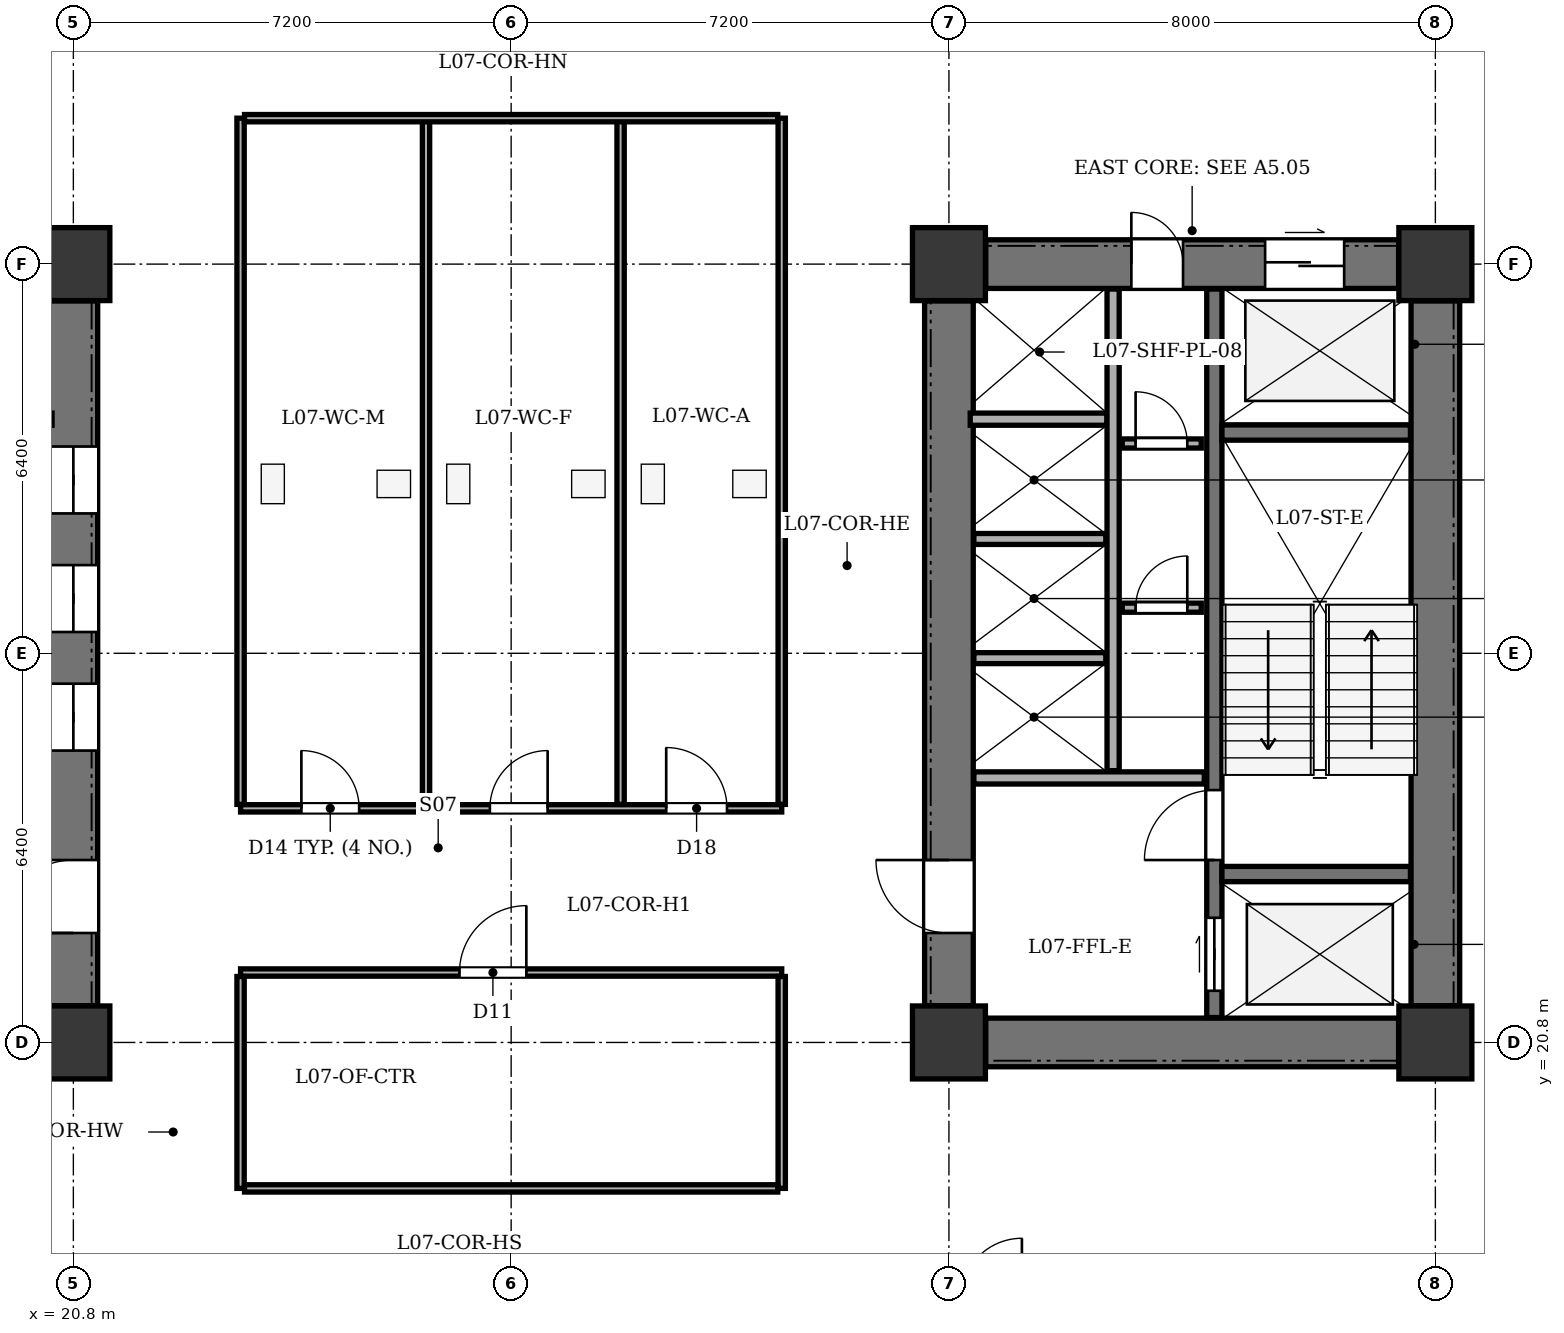
"""IFC4 building model, lengths in metres.
Left out: names, types, materials, properties, quantities, classifications, styles, units other than length and angle.
Written with IfcOpenShell. Run it as: python <this file> out.ifc"""

import sys

from ifc_helpers import new_model, si_unit, direction, frame, frame_2d, origin, origin_2d, place, context, subcontext, project, spatial, rectangle, extrude, element, fill, save


model = new_model("IFC4")
c1 = context("Model", 3, precision=1e-05, world=origin(), true_north=direction((0.0, 1.0)))
c2 = subcontext(c1, "Body", "Model", "MODEL_VIEW")
j1 = project(units=[si_unit("LENGTHUNIT", "METRE"), si_unit("PLANEANGLEUNIT", "RADIAN")], contexts=[c1])
p1 = place(None, origin())
s1 = spatial("IfcSite", under=j1, at=p1, CompositionType="ELEMENT")
p2 = place(p1, origin())
s2 = spatial("IfcBuilding", under=s1, at=p2, CompositionType="ELEMENT")
p3 = place(p2, frame((0.0, 0.0, 32.1)))
s3 = spatial("IfcBuildingStorey", under=s2, at=p3, CompositionType="ELEMENT", Elevation=32.1)
for number, where, z_axis, x_axis in (
    (1, (20.8, 20.8, 0.0), (0.0, 0.0, 1.0), (1.0, 0.0, 0.0)),
    (2, (20.8, 33.6, 0.0), (0.0, 0.0, 1.0), (1.0, 0.0, 0.0)),
    (3, (35.2, 20.8, 0.0), (0.0, 0.0, 1.0), (1.0, 0.0, 0.0)),
    (4, (43.2, 20.8, 0.0), (0.0, 0.0, 1.0), (1.0, 0.0, 0.0)),
    (5, (35.2, 33.6, 0.0), (0.0, 0.0, 1.0), (1.0, 0.0, 0.0)),
    (6, (43.2, 33.6, 0.0), (0.0, 0.0, 1.0), (1.0, 0.0, 0.0)),
):
    element("IfcColumn", number, at=place(p3, frame(where, z_axis=z_axis, x_axis=x_axis)), inside=s3, PredefinedType="COLUMN", context=c2, shape_type="SweptSolid", body=[
        extrude(rectangle(XDim=1.2, YDim=1.2, at=origin_2d()), origin(), (0.0, 0.0, 1.0), 3.9),
    ])
p4 = place(p3, frame((20.8, 21.405, 0.0), z_axis=(0.0, 0.0, 1.0), x_axis=(0.0, 1.0, 0.0)))
e7 = element("IfcWall", 7, at=p4, inside=s3, PredefinedType="SHEAR", context=c2, shape_type="SweptSolid", body=[
    extrude(rectangle(XDim=11.59, YDim=0.8, at=frame_2d((5.795, 0.0))), origin(), (0.0, 0.0, 1.0), 3.6),
])
p5 = place(p4, frame((1.195, 0.0, 0.0)))
e8 = element("IfcOpeningElement", 8, at=p5, cuts=e7, PredefinedType="OPENING", context=c2, shape_type="SweptSolid", body=[
    extrude(rectangle(XDim=1.2, YDim=2.15, at=frame_2d((0.6, 1.075))), frame((0.0, 0.41, 0.0), z_axis=(0.0, -1.0, 0.0), x_axis=(1.0, 0.0, 0.0)), (0.0, 0.0, 1.0), 0.82),
])
p6 = place(p4, frame((4.195, 0.0, 0.0)))
e9 = element("IfcOpeningElement", 9, at=p6, cuts=e7, PredefinedType="OPENING", context=c2, shape_type="SweptSolid", body=[
    extrude(rectangle(XDim=1.1, YDim=2.1, at=frame_2d((0.55, 1.05))), frame((0.0, 0.41, 0.0), z_axis=(0.0, -1.0, 0.0), x_axis=(1.0, 0.0, 0.0)), (0.0, 0.0, 1.0), 0.82),
])
p7 = place(p4, frame((6.145, 0.0, 0.0)))
e10 = element("IfcOpeningElement", 10, at=p7, cuts=e7, PredefinedType="OPENING", context=c2, shape_type="SweptSolid", body=[
    extrude(rectangle(XDim=1.1, YDim=2.1, at=frame_2d((0.55, 1.05))), frame((0.0, 0.41, 0.0), z_axis=(0.0, -1.0, 0.0), x_axis=(1.0, 0.0, 0.0)), (0.0, 0.0, 1.0), 0.82),
])
p8 = place(p4, frame((8.095, 0.0, 0.0)))
e11 = element("IfcOpeningElement", 11, at=p8, cuts=e7, PredefinedType="OPENING", context=c2, shape_type="SweptSolid", body=[
    extrude(rectangle(XDim=1.1, YDim=2.1, at=frame_2d((0.55, 1.05))), frame((0.0, 0.41, 0.0), z_axis=(0.0, -1.0, 0.0), x_axis=(1.0, 0.0, 0.0)), (0.0, 0.0, 1.0), 0.82),
])
p9 = place(p3, frame((43.2, 21.405, 0.0), z_axis=(0.0, 0.0, 1.0), x_axis=(0.0, 1.0, 0.0)))
e12 = element("IfcWall", 12, at=p9, inside=s3, PredefinedType="SHEAR", context=c2, shape_type="SweptSolid", body=[
    extrude(rectangle(XDim=11.59, YDim=0.8, at=frame_2d((5.795, 0.0))), origin(), (0.0, 0.0, 1.0), 3.6),
])
p10 = place(p3, frame((35.805, 20.8, 0.0), z_axis=(0.0, 0.0, 1.0), x_axis=(1.0, 0.0, 0.0)))
e13 = element("IfcWall", 13, at=p10, inside=s3, PredefinedType="SHEAR", context=c2, shape_type="SweptSolid", body=[
    extrude(rectangle(XDim=6.79, YDim=0.8, at=frame_2d((3.395, 0.0))), origin(), (0.0, 0.0, 1.0), 3.6),
])
p11 = place(p3, frame((35.805, 33.6, 0.0), z_axis=(0.0, 0.0, 1.0), x_axis=(1.0, 0.0, 0.0)))
e14 = element("IfcWall", 14, at=p11, inside=s3, PredefinedType="SHEAR", context=c2, shape_type="SweptSolid", body=[
    extrude(rectangle(XDim=6.79, YDim=0.8, at=frame_2d((3.395, 0.0))), origin(), (0.0, 0.0, 1.0), 3.6),
])
p12 = place(p11, frame((4.595, 0.0, 0.0)))
e15 = element("IfcOpeningElement", 15, at=p12, cuts=e14, PredefinedType="OPENING", context=c2, shape_type="SweptSolid", body=[
    extrude(rectangle(XDim=1.3, YDim=2.15, at=frame_2d((0.65, 1.075))), frame((0.0, 0.41, 0.0), z_axis=(0.0, -1.0, 0.0), x_axis=(1.0, 0.0, 0.0)), (0.0, 0.0, 1.0), 0.82),
])
p13 = place(p11, frame((2.395, 0.0, 0.0)))
e16 = element("IfcOpeningElement", 16, at=p13, cuts=e14, PredefinedType="OPENING", context=c2, shape_type="SweptSolid", body=[
    extrude(rectangle(XDim=0.85, YDim=2.02, at=frame_2d((0.425, 1.01))), frame((0.0, 0.41, 0.0), z_axis=(0.0, -1.0, 0.0), x_axis=(1.0, 0.0, 0.0)), (0.0, 0.0, 1.0), 0.82),
])
p14 = place(p3, frame((35.2, 21.405, 0.0), z_axis=(0.0, 0.0, 1.0), x_axis=(0.0, 1.0, 0.0)))
e17 = element("IfcWall", 17, at=p14, inside=s3, PredefinedType="SHEAR", context=c2, shape_type="SweptSolid", body=[
    extrude(rectangle(XDim=11.59, YDim=0.8, at=frame_2d((5.795, 0.0))), origin(), (0.0, 0.0, 1.0), 3.6),
])
p15 = place(p14, frame((1.195, 0.0, 0.0)))
e18 = element("IfcOpeningElement", 18, at=p15, cuts=e17, PredefinedType="OPENING", context=c2, shape_type="SweptSolid", body=[
    extrude(rectangle(XDim=1.2, YDim=2.15, at=frame_2d((0.6, 1.075))), frame((0.0, 0.41, 0.0), z_axis=(0.0, -1.0, 0.0), x_axis=(1.0, 0.0, 0.0)), (0.0, 0.0, 1.0), 0.82),
])
p16 = place(p3, frame((39.565, 21.21, 0.0), z_axis=(0.0, 0.0, 1.0), x_axis=(0.0, 1.0, 0.0)))
e19 = element("IfcWall", 19, at=p16, inside=s3, PredefinedType="SHEAR", context=c2, shape_type="SweptSolid", body=[
    extrude(rectangle(XDim=11.98, YDim=0.25, at=frame_2d((5.99, 0.0))), origin(), (0.0, 0.0, 1.0), 3.6),
])
p17 = place(p16, frame((0.44, 0.0, 0.0)))
e20 = element("IfcOpeningElement", 20, at=p17, cuts=e19, PredefinedType="OPENING", context=c2, shape_type="SweptSolid", body=[
    extrude(rectangle(XDim=1.2, YDim=2.15, at=frame_2d((0.6, 1.075))), frame((0.0, 0.135, 0.0), z_axis=(0.0, -1.0, 0.0), x_axis=(1.0, 0.0, 0.0)), (0.0, 0.0, 1.0), 0.27),
])
p18 = place(p16, frame((2.59, 0.0, 0.0)))
e21 = element("IfcOpeningElement", 21, at=p18, cuts=e19, PredefinedType="OPENING", context=c2, shape_type="SweptSolid", body=[
    extrude(rectangle(XDim=1.15, YDim=2.15, at=frame_2d((0.575, 1.075))), frame((0.0, 0.135, 0.0), z_axis=(0.0, -1.0, 0.0), x_axis=(1.0, 0.0, 0.0)), (0.0, 0.0, 1.0), 0.27),
])
for number, where, z_axis, x_axis in (
    (22, (39.69, 23.57, 0.0), (0.0, 0.0, 1.0), (1.0, 0.0, 0.0)),
    (23, (39.69, 30.83, 0.0), (0.0, 0.0, 1.0), (1.0, 0.0, 0.0)),
):
    element("IfcWall", number, at=place(p3, frame(where, z_axis=z_axis, x_axis=x_axis)), inside=s3, PredefinedType="SHEAR", context=c2, shape_type="SweptSolid", body=[
        extrude(rectangle(XDim=3.1, YDim=0.25, at=frame_2d((1.55, 0.0))), origin(), (0.0, 0.0, 1.0), 3.6),
    ])
p19 = place(p3, frame((35.61, 25.15, 0.0), z_axis=(0.0, 0.0, 1.0), x_axis=(1.0, 0.0, 0.0)))
e24 = element("IfcWall", 24, at=p19, inside=s3, PredefinedType="SOLIDWALL", context=c2, shape_type="SweptSolid", body=[
    extrude(rectangle(XDim=3.79, YDim=0.2, at=frame_2d((1.895, 0.0))), origin(), (0.0, 0.0, 1.0), 3.6),
])
p20 = place(p3, frame((35.55, 31.05, 0.0), z_axis=(0.0, 0.0, 1.0), x_axis=(1.0, 0.0, 0.0)))
e25 = element("IfcWall", 25, at=p20, inside=s3, PredefinedType="SOLIDWALL", context=c2, shape_type="SweptSolid", body=[
    extrude(rectangle(XDim=2.25, YDim=0.2, at=frame_2d((1.125, 0.0))), origin(), (0.0, 0.0, 1.0), 3.6),
])
p21 = place(p3, frame((37.9, 25.27, 0.0), z_axis=(0.0, 0.0, 1.0), x_axis=(0.0, 1.0, 0.0)))
e26 = element("IfcWall", 26, at=p21, inside=s3, PredefinedType="SOLIDWALL", context=c2, shape_type="SweptSolid", body=[
    extrude(rectangle(XDim=7.92, YDim=0.2, at=frame_2d((3.96, 0.0))), origin(), (0.0, 0.0, 1.0), 3.6),
])
for number, where, z_axis, x_axis in (
    (27, (35.61, 27.12, 0.0), (0.0, 0.0, 1.0), (1.0, 0.0, 0.0)),
    (28, (35.61, 29.08, 0.0), (0.0, 0.0, 1.0), (1.0, 0.0, 0.0)),
):
    element("IfcWall", number, at=place(p3, frame(where, z_axis=z_axis, x_axis=x_axis)), inside=s3, PredefinedType="PARTITIONING", context=c2, shape_type="SweptSolid", body=[
        extrude(rectangle(XDim=2.17, YDim=0.18, at=frame_2d((1.085, 0.0))), origin(), (0.0, 0.0, 1.0), 3.6),
    ])
p22 = place(p3, frame((38.05, 27.95, 0.0), z_axis=(0.0, 0.0, 1.0), x_axis=(1.0, 0.0, 0.0)))
e29 = element("IfcWall", 29, at=p22, inside=s3, PredefinedType="PARTITIONING", context=c2, shape_type="SweptSolid", body=[
    extrude(rectangle(XDim=1.3, YDim=0.15, at=frame_2d((0.65, 0.0))), origin(), (0.0, 0.0, 1.0), 3.6),
])
p23 = place(p22, frame((0.22, 0.0, 0.0)))
e30 = element("IfcOpeningElement", 30, at=p23, cuts=e29, PredefinedType="OPENING", context=c2, shape_type="SweptSolid", body=[
    extrude(rectangle(XDim=0.85, YDim=2.02, at=frame_2d((0.425, 1.01))), frame((0.0, 0.085, 0.0), z_axis=(0.0, -1.0, 0.0), x_axis=(1.0, 0.0, 0.0)), (0.0, 0.0, 1.0), 0.17),
])
p24 = place(p3, frame((38.05, 30.65, 0.0), z_axis=(0.0, 0.0, 1.0), x_axis=(1.0, 0.0, 0.0)))
e31 = element("IfcWall", 31, at=p24, inside=s3, PredefinedType="PARTITIONING", context=c2, shape_type="SweptSolid", body=[
    extrude(rectangle(XDim=1.3, YDim=0.15, at=frame_2d((0.65, 0.0))), origin(), (0.0, 0.0, 1.0), 3.6),
])
p25 = place(p24, frame((0.22, 0.0, 0.0)))
e32 = element("IfcOpeningElement", 32, at=p25, cuts=e31, PredefinedType="OPENING", context=c2, shape_type="SweptSolid", body=[
    extrude(rectangle(XDim=0.85, YDim=2.02, at=frame_2d((0.425, 1.01))), frame((0.0, 0.085, 0.0), z_axis=(0.0, -1.0, 0.0), x_axis=(1.0, 0.0, 0.0)), (0.0, 0.0, 1.0), 0.17),
])
p26 = place(p3, frame((23.55, 24.65, 0.0), z_axis=(0.0, 0.0, 1.0), x_axis=(1.0, 0.0, 0.0)))
e33 = element("IfcWall", 33, at=p26, inside=s3, PredefinedType="PARTITIONING", context=c2, shape_type="SweptSolid", body=[
    extrude(rectangle(XDim=8.9, YDim=0.12, at=frame_2d((4.45, 0.0))), origin(), (0.0, 0.0, 1.0), 3.135),
])
p27 = place(p26, frame((1.0, 0.0, 0.0)))
e34 = element("IfcOpeningElement", 34, at=p27, cuts=e33, PredefinedType="OPENING", context=c2, shape_type="SweptSolid", body=[
    extrude(rectangle(XDim=0.95, YDim=2.1, at=frame_2d((0.475, 1.05))), frame((0.0, 0.07, 0.0), z_axis=(0.0, -1.0, 0.0), x_axis=(1.0, 0.0, 0.0)), (0.0, 0.0, 1.0), 0.14),
])
p28 = place(p26, frame((4.1, 0.0, 0.0)))
e35 = element("IfcOpeningElement", 35, at=p28, cuts=e33, PredefinedType="OPENING", context=c2, shape_type="SweptSolid", body=[
    extrude(rectangle(XDim=0.95, YDim=2.1, at=frame_2d((0.475, 1.05))), frame((0.0, 0.07, 0.0), z_axis=(0.0, -1.0, 0.0), x_axis=(1.0, 0.0, 0.0)), (0.0, 0.0, 1.0), 0.14),
])
p29 = place(p26, frame((7.0, 0.0, 0.0)))
e36 = element("IfcOpeningElement", 36, at=p29, cuts=e33, PredefinedType="OPENING", context=c2, shape_type="SweptSolid", body=[
    extrude(rectangle(XDim=1.0, YDim=2.1, at=frame_2d((0.5, 1.05))), frame((0.0, 0.07, 0.0), z_axis=(0.0, -1.0, 0.0), x_axis=(1.0, 0.0, 0.0)), (0.0, 0.0, 1.0), 0.14),
])
for number, where, z_axis, x_axis in (
    (37, (23.55, 24.715, 0.0), (0.0, 0.0, 1.0), (0.0, 1.0, 0.0)),
    (38, (32.45, 24.715, 0.0), (0.0, 0.0, 1.0), (0.0, 1.0, 0.0)),
    (39, (26.6, 24.715, 0.0), (0.0, 0.0, 1.0), (0.0, 1.0, 0.0)),
):
    element("IfcWall", number, at=place(p3, frame(where, z_axis=z_axis, x_axis=x_axis)), inside=s3, PredefinedType="PARTITIONING", context=c2, shape_type="SweptSolid", body=[
        extrude(rectangle(XDim=11.285, YDim=0.12, at=frame_2d((5.643, 0.0))), origin(), (0.0, 0.0, 1.0), 3.6),
    ])
p30 = place(p3, frame((29.8, 24.715, 0.0), z_axis=(0.0, 0.0, 1.0), x_axis=(0.0, 1.0, 0.0)))
e40 = element("IfcWall", 40, at=p30, inside=s3, PredefinedType="PARTITIONING", context=c2, shape_type="SweptSolid", body=[
    extrude(rectangle(XDim=11.285, YDim=0.12, at=frame_2d((5.643, 0.0))), origin(), (0.0, 0.0, 1.0), 3.135),
])
p31 = place(p3, frame((23.615, 36.0, 0.0), z_axis=(0.0, 0.0, 1.0), x_axis=(1.0, 0.0, 0.0)))
e41 = element("IfcWall", 41, at=p31, inside=s3, PredefinedType="PARTITIONING", context=c2, shape_type="SweptSolid", body=[
    extrude(rectangle(XDim=8.77, YDim=0.12, at=frame_2d((4.385, 0.0))), origin(), (0.0, 0.0, 1.0), 3.6),
])
p32 = place(p3, frame((23.55, 21.95, 0.0), z_axis=(0.0, 0.0, 1.0), x_axis=(1.0, 0.0, 0.0)))
e42 = element("IfcWall", 42, at=p32, inside=s3, PredefinedType="PARTITIONING", context=c2, shape_type="SweptSolid", body=[
    extrude(rectangle(XDim=8.9, YDim=0.12, at=frame_2d((4.45, 0.0))), origin(), (0.0, 0.0, 1.0), 3.135),
])
p33 = place(p32, frame((3.6, 0.0, 0.0)))
e43 = element("IfcOpeningElement", 43, at=p33, cuts=e42, PredefinedType="OPENING", context=c2, shape_type="SweptSolid", body=[
    extrude(rectangle(XDim=1.1, YDim=2.15, at=frame_2d((0.55, 1.075))), frame((0.0, 0.07, 0.0), z_axis=(0.0, -1.0, 0.0), x_axis=(1.0, 0.0, 0.0)), (0.0, 0.0, 1.0), 0.14),
])
for number, where, z_axis, x_axis in (
    (44, (23.55, 18.4, 0.0), (0.0, 0.0, 1.0), (0.0, 1.0, 0.0)),
    (45, (32.45, 18.4, 0.0), (0.0, 0.0, 1.0), (0.0, 1.0, 0.0)),
):
    element("IfcWall", number, at=place(p3, frame(where, z_axis=z_axis, x_axis=x_axis)), inside=s3, PredefinedType="PARTITIONING", context=c2, shape_type="SweptSolid", body=[
        extrude(rectangle(XDim=3.485, YDim=0.12, at=frame_2d((1.743, 0.0))), origin(), (0.0, 0.0, 1.0), 3.6),
    ])
p34 = place(p3, frame((23.615, 18.4, 0.0), z_axis=(0.0, 0.0, 1.0), x_axis=(1.0, 0.0, 0.0)))
e46 = element("IfcWall", 46, at=p34, inside=s3, PredefinedType="PARTITIONING", context=c2, shape_type="SweptSolid", body=[
    extrude(rectangle(XDim=8.77, YDim=0.12, at=frame_2d((4.385, 0.0))), origin(), (0.0, 0.0, 1.0), 3.6),
])
p35 = place(p5, origin())
e47 = element("IfcDoor", 47, at=p35, inside=s3, OperationType="SINGLE_SWING_LEFT", PredefinedType="DOOR", context=c2, shape_type="SweptSolid", body=[
    extrude(rectangle(XDim=1.2, YDim=2.15, at=frame_2d((0.6, 1.075))), frame((0.0, 0.025, 0.0), z_axis=(0.0, -1.0, 0.0), x_axis=(1.0, 0.0, 0.0)), (0.0, 0.0, 1.0), 0.05),
])
fill(e8, e47)
p36 = place(p6, origin())
e48 = element("IfcDoor", 48, at=p36, inside=s3, OperationType="DOUBLE_DOOR_SLIDING", PredefinedType="DOOR", context=c2, shape_type="SweptSolid", body=[
    extrude(rectangle(XDim=1.1, YDim=2.1, at=frame_2d((0.55, 1.05))), frame((0.0, 0.025, 0.0), z_axis=(0.0, -1.0, 0.0), x_axis=(1.0, 0.0, 0.0)), (0.0, 0.0, 1.0), 0.05),
])
fill(e9, e48)
p37 = place(p7, origin())
e49 = element("IfcDoor", 49, at=p37, inside=s3, OperationType="DOUBLE_DOOR_SLIDING", PredefinedType="DOOR", context=c2, shape_type="SweptSolid", body=[
    extrude(rectangle(XDim=1.1, YDim=2.1, at=frame_2d((0.55, 1.05))), frame((0.0, 0.025, 0.0), z_axis=(0.0, -1.0, 0.0), x_axis=(1.0, 0.0, 0.0)), (0.0, 0.0, 1.0), 0.05),
])
fill(e10, e49)
p38 = place(p8, origin())
e50 = element("IfcDoor", 50, at=p38, inside=s3, OperationType="DOUBLE_DOOR_SLIDING", PredefinedType="DOOR", context=c2, shape_type="SweptSolid", body=[
    extrude(rectangle(XDim=1.1, YDim=2.1, at=frame_2d((0.55, 1.05))), frame((0.0, 0.025, 0.0), z_axis=(0.0, -1.0, 0.0), x_axis=(1.0, 0.0, 0.0)), (0.0, 0.0, 1.0), 0.05),
])
fill(e11, e50)
p39 = place(p12, origin())
e51 = element("IfcDoor", 51, at=p39, inside=s3, OperationType="DOUBLE_DOOR_SLIDING", PredefinedType="DOOR", context=c2, shape_type="SweptSolid", body=[
    extrude(rectangle(XDim=1.3, YDim=2.15, at=frame_2d((0.65, 1.075))), frame((0.0, 0.025, 0.0), z_axis=(0.0, -1.0, 0.0), x_axis=(1.0, 0.0, 0.0)), (0.0, 0.0, 1.0), 0.05),
])
fill(e15, e51)
p40 = place(p13, origin())
e52 = element("IfcDoor", 52, at=p40, inside=s3, OperationType="SINGLE_SWING_LEFT", PredefinedType="DOOR", context=c2, shape_type="SweptSolid", body=[
    extrude(rectangle(XDim=0.85, YDim=2.02, at=frame_2d((0.425, 1.01))), frame((0.0, 0.025, 0.0), z_axis=(0.0, -1.0, 0.0), x_axis=(1.0, 0.0, 0.0)), (0.0, 0.0, 1.0), 0.05),
])
fill(e16, e52)
p41 = place(p15, origin())
e53 = element("IfcDoor", 53, at=p41, inside=s3, OperationType="SINGLE_SWING_RIGHT", PredefinedType="DOOR", context=c2, shape_type="SweptSolid", body=[
    extrude(rectangle(XDim=1.2, YDim=2.15, at=frame_2d((0.6, 1.075))), frame((0.0, 0.025, 0.0), z_axis=(0.0, -1.0, 0.0), x_axis=(1.0, 0.0, 0.0)), (0.0, 0.0, 1.0), 0.05),
])
fill(e18, e53)
p42 = place(p17, origin())
e54 = element("IfcDoor", 54, at=p42, inside=s3, OperationType="DOUBLE_DOOR_SLIDING", PredefinedType="DOOR", context=c2, shape_type="SweptSolid", body=[
    extrude(rectangle(XDim=1.2, YDim=2.15, at=frame_2d((0.6, 1.075))), frame((0.0, 0.025, 0.0), z_axis=(0.0, -1.0, 0.0), x_axis=(1.0, 0.0, 0.0)), (0.0, 0.0, 1.0), 0.05),
])
fill(e20, e54)
p43 = place(p18, origin())
e55 = element("IfcDoor", 55, at=p43, inside=s3, OperationType="SINGLE_SWING_LEFT", PredefinedType="DOOR", context=c2, shape_type="SweptSolid", body=[
    extrude(rectangle(XDim=1.15, YDim=2.15, at=frame_2d((0.575, 1.075))), frame((0.0, 0.025, 0.0), z_axis=(0.0, -1.0, 0.0), x_axis=(1.0, 0.0, 0.0)), (0.0, 0.0, 1.0), 0.05),
])
fill(e21, e55)
p44 = place(p23, origin())
e56 = element("IfcDoor", 56, at=p44, inside=s3, OperationType="SINGLE_SWING_RIGHT", PredefinedType="DOOR", context=c2, shape_type="SweptSolid", body=[
    extrude(rectangle(XDim=0.85, YDim=2.02, at=frame_2d((0.425, 1.01))), frame((0.0, 0.025, 0.0), z_axis=(0.0, -1.0, 0.0), x_axis=(1.0, 0.0, 0.0)), (0.0, 0.0, 1.0), 0.05),
])
fill(e30, e56)
p45 = place(p25, origin())
e57 = element("IfcDoor", 57, at=p45, inside=s3, OperationType="SINGLE_SWING_LEFT", PredefinedType="DOOR", context=c2, shape_type="SweptSolid", body=[
    extrude(rectangle(XDim=0.85, YDim=2.02, at=frame_2d((0.425, 1.01))), frame((0.0, 0.025, 0.0), z_axis=(0.0, -1.0, 0.0), x_axis=(1.0, 0.0, 0.0)), (0.0, 0.0, 1.0), 0.05),
])
fill(e32, e57)
p46 = place(p27, origin())
e58 = element("IfcDoor", 58, at=p46, inside=s3, OperationType="SINGLE_SWING_LEFT", PredefinedType="DOOR", context=c2, shape_type="SweptSolid", body=[
    extrude(rectangle(XDim=0.95, YDim=2.1, at=frame_2d((0.475, 1.05))), frame((0.0, 0.025, 0.0), z_axis=(0.0, -1.0, 0.0), x_axis=(1.0, 0.0, 0.0)), (0.0, 0.0, 1.0), 0.05),
])
fill(e34, e58)
p47 = place(p28, origin())
e59 = element("IfcDoor", 59, at=p47, inside=s3, OperationType="SINGLE_SWING_RIGHT", PredefinedType="DOOR", context=c2, shape_type="SweptSolid", body=[
    extrude(rectangle(XDim=0.95, YDim=2.1, at=frame_2d((0.475, 1.05))), frame((0.0, 0.025, 0.0), z_axis=(0.0, -1.0, 0.0), x_axis=(1.0, 0.0, 0.0)), (0.0, 0.0, 1.0), 0.05),
])
fill(e35, e59)
p48 = place(p29, origin())
e60 = element("IfcDoor", 60, at=p48, inside=s3, OperationType="SINGLE_SWING_LEFT", PredefinedType="DOOR", context=c2, shape_type="SweptSolid", body=[
    extrude(rectangle(XDim=1.0, YDim=2.1, at=frame_2d((0.5, 1.05))), frame((0.0, 0.025, 0.0), z_axis=(0.0, -1.0, 0.0), x_axis=(1.0, 0.0, 0.0)), (0.0, 0.0, 1.0), 0.05),
])
fill(e36, e60)
p49 = place(p33, origin())
e61 = element("IfcDoor", 61, at=p49, inside=s3, OperationType="SINGLE_SWING_RIGHT", PredefinedType="DOOR", context=c2, shape_type="SweptSolid", body=[
    extrude(rectangle(XDim=1.1, YDim=2.15, at=frame_2d((0.55, 1.075))), frame((0.0, 0.025, 0.0), z_axis=(0.0, -1.0, 0.0), x_axis=(1.0, 0.0, 0.0)), (0.0, 0.0, 1.0), 0.05),
])
fill(e43, e61)
save(model, sys.argv[1])
